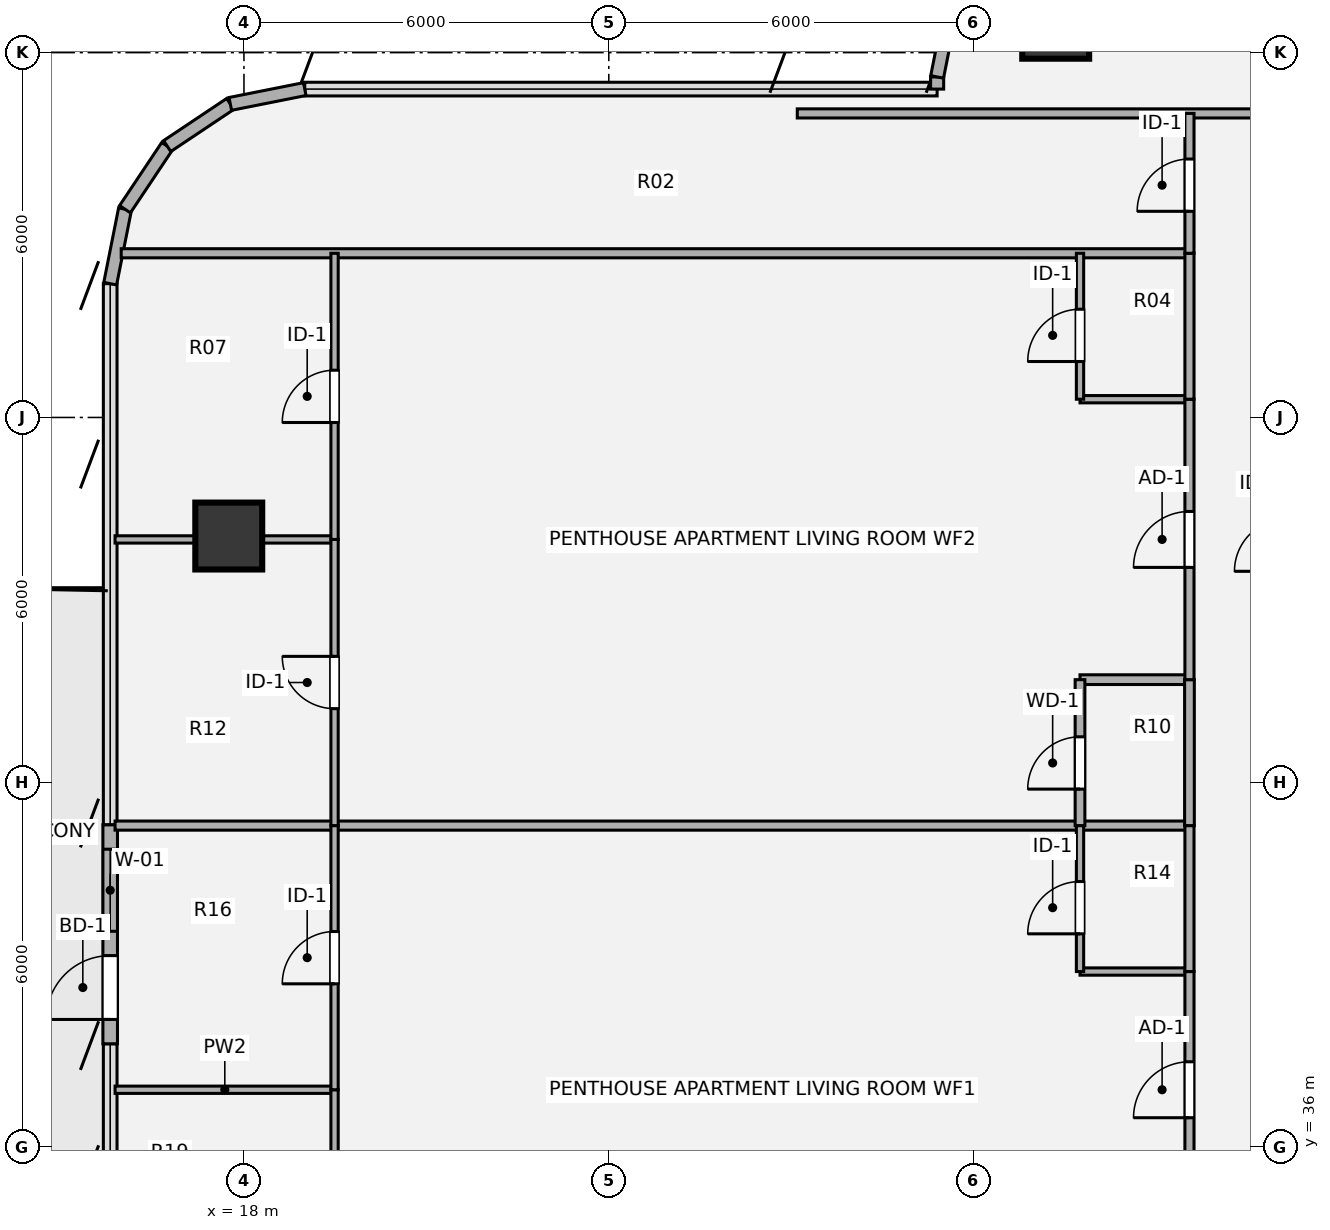
"""IFC4 building model, lengths in metres.
Left out: names, types, materials, properties, quantities, classifications, styles, units other than length and angle.
Written with IfcOpenShell. Run it as: python <this file> out.ifc"""

import sys

from ifc_helpers import new_model, si_unit, direction, frame, frame_2d, origin, origin_2d, place, context, subcontext, project, spatial, rectangle, hollow_circle, extrude, source, transform, mapped, element, fill, save


model = new_model("IFC4")
c1 = context("Model", 3, precision=1e-05, world=origin(), true_north=direction((0.0, 1.0)))
c2 = subcontext(c1, "Body", "Model", "MODEL_VIEW")
j1 = project(units=[si_unit("LENGTHUNIT", "METRE"), si_unit("PLANEANGLEUNIT", "RADIAN")], contexts=[c1])
p1 = place(None, origin())
s1 = spatial("IfcSite", under=j1, at=p1, CompositionType="ELEMENT")
p2 = place(p1, origin())
s2 = spatial("IfcBuilding", under=s1, at=p2, CompositionType="ELEMENT")
p3 = place(p2, frame((0.0, 0.0, 163.98)))
s3 = spatial("IfcBuildingStorey", under=s2, at=p3, CompositionType="ELEMENT", Elevation=163.98)
m1 = source(origin(), c2, "Body", "SweptSolid", [
    extrude(hollow_circle(Radius=0.55, WallThickness=0.04, at=origin_2d()), origin(), (0.0, 0.0, 1.0), 3.78),
])
for number, where, z_axis, x_axis in (
    (1, (17.75, 46.05, 0.0), (0.0, 0.0, 1.0), (1.0, 0.0, 0.0)),
    (2, (31.35, 54.45, 0.0), (0.0, 0.0, 1.0), (1.0, 0.0, 0.0)),
):
    element("IfcColumn", number, at=place(p3, frame(where, z_axis=z_axis, x_axis=x_axis)), inside=s3, PredefinedType="COLUMN", context=c2, shape_type="MappedRepresentation", body=[
        mapped(m1, transform((0.0, 0.0, 0.0), x_axis=(1.0, 0.0, 0.0), y_axis=(0.0, 1.0, 0.0), z_axis=(0.0, 0.0, 1.0), scale=1.0)),
    ])
p4 = place(p3, frame((15.8, 37.7, 0.0), z_axis=(0.0, 0.0, 1.0), x_axis=(0.0, 1.0, 0.0)))
e3 = element("IfcWall", 3, at=p4, inside=s3, PredefinedType="SOLIDWALL", context=c2, shape_type="SweptSolid", body=[
    extrude(rectangle(XDim=3.6, YDim=0.24, at=frame_2d((1.8, 0.0))), origin(), (0.0, 0.0, 1.0), 3.53),
])
p5 = place(p4, frame((0.4, 0.0, 0.0)))
e4 = element("IfcOpeningElement", 4, at=p5, cuts=e3, PredefinedType="OPENING", context=c2, shape_type="SweptSolid", body=[
    extrude(rectangle(XDim=1.05, YDim=2.15, at=origin_2d()), frame((0.525, 0.13, 1.075), z_axis=(0.0, -1.0, 0.0), x_axis=(1.0, 0.0, 0.0)), (0.0, 0.0, 1.0), 0.26),
])
p6 = place(p4, frame((1.85, 0.0, 0.85)))
e5 = element("IfcOpeningElement", 5, at=p6, cuts=e3, PredefinedType="OPENING", context=c2, shape_type="SweptSolid", body=[
    extrude(rectangle(XDim=1.35, YDim=1.35, at=origin_2d()), frame((0.675, 0.13, 0.675), z_axis=(0.0, -1.0, 0.0), x_axis=(1.0, 0.0, 0.0)), (0.0, 0.0, 1.0), 0.26),
])
for number, where, z_axis, x_axis in (
    (6, (15.8, 50.2, 0.0), (0.0, 0.0, 1.0), (0.195, 0.981, 0.0)),
    (7, (16.044, 51.425, 0.0), (0.0, 0.0, 1.0), (0.556, 0.831, 0.0)),
    (8, (16.737, 52.463, 0.0), (0.0, 0.0, 1.0), (0.831, 0.556, 0.0)),
    (9, (17.775, 53.156, 0.0), (0.0, 0.0, 1.0), (0.981, 0.195, 0.0)),
):
    element("IfcWall", number, at=place(p3, frame(where, z_axis=z_axis, x_axis=x_axis)), inside=s3, PredefinedType="SOLIDWALL", context=c2, shape_type="SweptSolid", body=[
        extrude(rectangle(XDim=1.249, YDim=0.215, at=frame_2d((0.624, 0.0))), origin(), (0.0, 0.0, 1.0), 3.53),
    ])
p7 = place(p3, frame((29.4, 53.4, 0.0), z_axis=(0.0, 0.0, 1.0), x_axis=(0.0, 1.0, 0.0)))
e10 = element("IfcWall", 10, at=p7, inside=s3, PredefinedType="SOLIDWALL", context=c2, shape_type="SweptSolid", body=[
    extrude(rectangle(XDim=0.2, YDim=0.215, at=frame_2d((0.1, 0.0))), origin(), (0.0, 0.0, 1.0), 3.53),
])
p8 = place(p3, frame((29.4, 53.6, 0.0), z_axis=(0.0, 0.0, 1.0), x_axis=(0.195127417394, 0.980777900945, 0.0)))
e11 = element("IfcWall", 11, at=p8, inside=s3, PredefinedType="SOLIDWALL", context=c2, shape_type="SweptSolid", body=[
    extrude(rectangle(XDim=1.092, YDim=0.215, at=frame_2d((0.546, 0.0))), origin(), (0.0, 0.0, 1.0), 3.53),
])
p9 = place(p3, frame((15.88, 36.944, 0.0), z_axis=(0.0, 0.0, 1.0), x_axis=(1.0, 0.0, 0.0)))
e12 = element("IfcWall", 12, at=p9, inside=s3, PredefinedType="PARTITIONING", context=c2, shape_type="SweptSolid", body=[
    extrude(rectangle(XDim=3.61, YDim=0.12, at=frame_2d((1.805, 0.0))), origin(), (0.0, 0.0, 1.0), 2.982),
])
p10 = place(p3, frame((31.75, 38.888, 0.0), z_axis=(0.0, 0.0, 1.0), x_axis=(1.0, 0.0, 0.0)))
e13 = element("IfcWall", 13, at=p10, inside=s3, PredefinedType="PARTITIONING", context=c2, shape_type="SweptSolid", body=[
    extrude(rectangle(XDim=1.8, YDim=0.12, at=frame_2d((0.9, 0.0))), origin(), (0.0, 0.0, 1.0), 3.259),
])
p11 = place(p3, frame((15.88, 41.288, 0.0), z_axis=(0.0, 0.0, 1.0), x_axis=(1.0, 0.0, 0.0)))
e14 = element("IfcWall", 14, at=p11, inside=s3, PredefinedType="PARTITIONING", context=c2, shape_type="SweptSolid", body=[
    extrude(rectangle(XDim=17.67, YDim=0.15, at=frame_2d((8.835, 0.0))), origin(), (0.0, 0.0, 1.0), 2.982),
])
p12 = place(p3, frame((31.75, 43.688, 0.0), z_axis=(0.0, 0.0, 1.0), x_axis=(1.0, 0.0, 0.0)))
e15 = element("IfcWall", 15, at=p12, inside=s3, PredefinedType="PLUMBINGWALL", context=c2, shape_type="SweptSolid", body=[
    extrude(rectangle(XDim=1.8, YDim=0.16, at=frame_2d((0.9, 0.0))), origin(), (0.0, 0.0, 1.0), 3.259),
])
p13 = place(p3, frame((15.88, 45.994, 0.0), z_axis=(0.0, 0.0, 1.0), x_axis=(1.0, 0.0, 0.0)))
e16 = element("IfcWall", 16, at=p13, inside=s3, PredefinedType="PARTITIONING", context=c2, shape_type="SweptSolid", body=[
    extrude(rectangle(XDim=3.61, YDim=0.12, at=frame_2d((1.805, 0.0))), origin(), (0.0, 0.0, 1.0), 2.903),
])
p14 = place(p3, frame((31.75, 48.3, 0.0), z_axis=(0.0, 0.0, 1.0), x_axis=(1.0, 0.0, 0.0)))
e17 = element("IfcWall", 17, at=p14, inside=s3, PredefinedType="PARTITIONING", context=c2, shape_type="SweptSolid", body=[
    extrude(rectangle(XDim=1.8, YDim=0.12, at=frame_2d((0.9, 0.0))), origin(), (0.0, 0.0, 1.0), 3.259),
])
p15 = place(p3, frame((15.981, 50.7, 0.0), z_axis=(0.0, 0.0, 1.0), x_axis=(1.0, 0.0, 0.0)))
e18 = element("IfcWall", 18, at=p15, inside=s3, PredefinedType="PARTITIONING", context=c2, shape_type="SweptSolid", body=[
    extrude(rectangle(XDim=17.569, YDim=0.15, at=frame_2d((8.785, 0.0))), origin(), (0.0, 0.0, 1.0), 3.308),
])
p16 = place(p3, frame((27.1, 53.0, 0.0), z_axis=(0.0, 0.0, 1.0), x_axis=(1.0, 0.0, 0.0)))
e19 = element("IfcWall", 19, at=p16, inside=s3, PredefinedType="PARTITIONING", context=c2, shape_type="SweptSolid", body=[
    extrude(rectangle(XDim=17.8, YDim=0.15, at=frame_2d((8.9, 0.0))), origin(), (0.0, 0.0, 1.0), 3.308),
])
p17 = place(p16, frame((8.375, 0.0, 0.0)))
e20 = element("IfcOpeningElement", 20, at=p17, cuts=e19, PredefinedType="OPENING", context=c2, shape_type="SweptSolid", body=[
    extrude(rectangle(XDim=1.05, YDim=2.1, at=origin_2d()), frame((0.525, 0.085, 1.05), z_axis=(0.0, -1.0, 0.0), x_axis=(1.0, 0.0, 0.0)), (0.0, 0.0, 1.0), 0.17),
])
p18 = place(p3, frame((19.49, 32.48, 0.0), z_axis=(0.0, 0.0, 1.0), x_axis=(0.0, 1.0, 0.0)))
e21 = element("IfcWall", 21, at=p18, inside=s3, PredefinedType="PARTITIONING", context=c2, shape_type="SweptSolid", body=[
    extrude(rectangle(XDim=4.464, YDim=0.12, at=frame_2d((2.232, 0.0))), origin(), (0.0, 0.0, 1.0), 3.5),
])
p19 = place(p18, frame((0.362, 0.0, 0.0)))
e22 = element("IfcOpeningElement", 22, at=p19, cuts=e21, PredefinedType="OPENING", context=c2, shape_type="SweptSolid", body=[
    extrude(rectangle(XDim=0.86, YDim=2.1, at=origin_2d()), frame((0.43, 0.07, 1.05), z_axis=(0.0, -1.0, 0.0), x_axis=(1.0, 0.0, 0.0)), (0.0, 0.0, 1.0), 0.14),
])
p20 = place(p3, frame((19.49, 36.944, 0.0), z_axis=(0.0, 0.0, 1.0), x_axis=(0.0, 1.0, 0.0)))
e23 = element("IfcWall", 23, at=p20, inside=s3, PredefinedType="PARTITIONING", context=c2, shape_type="SweptSolid", body=[
    extrude(rectangle(XDim=4.344, YDim=0.12, at=frame_2d((2.172, 0.0))), origin(), (0.0, 0.0, 1.0), 3.5),
])
p21 = place(p20, frame((1.742, 0.0, 0.0)))
e24 = element("IfcOpeningElement", 24, at=p21, cuts=e23, PredefinedType="OPENING", context=c2, shape_type="SweptSolid", body=[
    extrude(rectangle(XDim=0.86, YDim=2.1, at=origin_2d()), frame((0.43, 0.07, 1.05), z_axis=(0.0, -1.0, 0.0), x_axis=(1.0, 0.0, 0.0)), (0.0, 0.0, 1.0), 0.14),
])
p22 = place(p3, frame((19.49, 41.288, 0.0), z_axis=(0.0, 0.0, 1.0), x_axis=(0.0, 1.0, 0.0)))
e25 = element("IfcWall", 25, at=p22, inside=s3, PredefinedType="PARTITIONING", context=c2, shape_type="SweptSolid", body=[
    extrude(rectangle(XDim=4.706, YDim=0.12, at=frame_2d((2.353, 0.0))), origin(), (0.0, 0.0, 1.0), 3.5),
])
p23 = place(p22, frame((1.923, 0.0, 0.0)))
e26 = element("IfcOpeningElement", 26, at=p23, cuts=e25, PredefinedType="OPENING", context=c2, shape_type="SweptSolid", body=[
    extrude(rectangle(XDim=0.86, YDim=2.1, at=origin_2d()), frame((0.43, 0.07, 1.05), z_axis=(0.0, -1.0, 0.0), x_axis=(1.0, 0.0, 0.0)), (0.0, 0.0, 1.0), 0.14),
])
p24 = place(p3, frame((19.49, 45.994, 0.0), z_axis=(0.0, 0.0, 1.0), x_axis=(0.0, 1.0, 0.0)))
e27 = element("IfcWall", 27, at=p24, inside=s3, PredefinedType="PARTITIONING", context=c2, shape_type="SweptSolid", body=[
    extrude(rectangle(XDim=4.706, YDim=0.12, at=frame_2d((2.353, 0.0))), origin(), (0.0, 0.0, 1.0), 3.5),
])
p25 = place(p24, frame((1.923, 0.0, 0.0)))
e28 = element("IfcOpeningElement", 28, at=p25, cuts=e27, PredefinedType="OPENING", context=c2, shape_type="SweptSolid", body=[
    extrude(rectangle(XDim=0.86, YDim=2.1, at=origin_2d()), frame((0.43, 0.07, 1.05), z_axis=(0.0, -1.0, 0.0), x_axis=(1.0, 0.0, 0.0)), (0.0, 0.0, 1.0), 0.14),
])
p26 = place(p3, frame((31.75, 38.888, 0.0), z_axis=(0.0, 0.0, 1.0), x_axis=(0.0, 1.0, 0.0)))
e29 = element("IfcWall", 29, at=p26, inside=s3, PredefinedType="PARTITIONING", context=c2, shape_type="SweptSolid", body=[
    extrude(rectangle(XDim=2.4, YDim=0.12, at=frame_2d((1.2, 0.0))), origin(), (0.0, 0.0, 1.0), 3.5),
])
p27 = place(p26, frame((0.62, 0.0, 0.0)))
e30 = element("IfcOpeningElement", 30, at=p27, cuts=e29, PredefinedType="OPENING", context=c2, shape_type="SweptSolid", body=[
    extrude(rectangle(XDim=0.86, YDim=2.1, at=origin_2d()), frame((0.43, 0.07, 1.05), z_axis=(0.0, -1.0, 0.0), x_axis=(1.0, 0.0, 0.0)), (0.0, 0.0, 1.0), 0.14),
])
p28 = place(p3, frame((31.75, 41.288, 0.0), z_axis=(0.0, 0.0, 1.0), x_axis=(0.0, 1.0, 0.0)))
e31 = element("IfcWall", 31, at=p28, inside=s3, PredefinedType="PLUMBINGWALL", context=c2, shape_type="SweptSolid", body=[
    extrude(rectangle(XDim=2.4, YDim=0.16, at=frame_2d((1.2, 0.0))), origin(), (0.0, 0.0, 1.0), 3.5),
])
p29 = place(p28, frame((0.6, 0.0, 0.0)))
e32 = element("IfcOpeningElement", 32, at=p29, cuts=e31, PredefinedType="OPENING", context=c2, shape_type="SweptSolid", body=[
    extrude(rectangle(XDim=0.86, YDim=2.1, at=origin_2d()), frame((0.43, 0.09, 1.05), z_axis=(0.0, -1.0, 0.0), x_axis=(1.0, 0.0, 0.0)), (0.0, 0.0, 1.0), 0.18),
])
p30 = place(p3, frame((31.75, 48.3, 0.0), z_axis=(0.0, 0.0, 1.0), x_axis=(0.0, 1.0, 0.0)))
e33 = element("IfcWall", 33, at=p30, inside=s3, PredefinedType="PARTITIONING", context=c2, shape_type="SweptSolid", body=[
    extrude(rectangle(XDim=2.4, YDim=0.12, at=frame_2d((1.2, 0.0))), origin(), (0.0, 0.0, 1.0), 3.5),
])
p31 = place(p30, frame((0.62, 0.0, 0.0)))
e34 = element("IfcOpeningElement", 34, at=p31, cuts=e33, PredefinedType="OPENING", context=c2, shape_type="SweptSolid", body=[
    extrude(rectangle(XDim=0.86, YDim=2.1, at=origin_2d()), frame((0.43, 0.07, 1.05), z_axis=(0.0, -1.0, 0.0), x_axis=(1.0, 0.0, 0.0)), (0.0, 0.0, 1.0), 0.14),
])
p32 = place(p3, frame((33.55, 35.0, 0.0), z_axis=(0.0, 0.0, 1.0), x_axis=(0.0, 1.0, 0.0)))
e35 = element("IfcWall", 35, at=p32, inside=s3, PredefinedType="PARTITIONING", context=c2, shape_type="SweptSolid", body=[
    extrude(rectangle(XDim=3.888, YDim=0.15, at=frame_2d((1.944, 0.0))), origin(), (0.0, 0.0, 1.0), 3.5),
])
p33 = place(p32, frame((1.484, 0.0, 0.0)))
e36 = element("IfcOpeningElement", 36, at=p33, cuts=e35, PredefinedType="OPENING", context=c2, shape_type="SweptSolid", body=[
    extrude(rectangle(XDim=0.92, YDim=2.1, at=origin_2d()), frame((0.46, 0.085, 1.05), z_axis=(0.0, -1.0, 0.0), x_axis=(1.0, 0.0, 0.0)), (0.0, 0.0, 1.0), 0.17),
])
p34 = place(p3, frame((33.55, 38.888, 0.0), z_axis=(0.0, 0.0, 1.0), x_axis=(0.0, 1.0, 0.0)))
e37 = element("IfcWall", 37, at=p34, inside=s3, PredefinedType="PARTITIONING", context=c2, shape_type="SweptSolid", body=[
    extrude(rectangle(XDim=2.4, YDim=0.15, at=frame_2d((1.2, 0.0))), origin(), (0.0, 0.0, 1.0), 3.5),
])
p35 = place(p3, frame((33.55, 41.288, 0.0), z_axis=(0.0, 0.0, 1.0), x_axis=(0.0, 1.0, 0.0)))
e38 = element("IfcWall", 38, at=p35, inside=s3, PredefinedType="PLUMBINGWALL", context=c2, shape_type="SweptSolid", body=[
    extrude(rectangle(XDim=2.4, YDim=0.16, at=frame_2d((1.2, 0.0))), origin(), (0.0, 0.0, 1.0), 3.5),
])
p36 = place(p3, frame((33.55, 43.688, 0.0), z_axis=(0.0, 0.0, 1.0), x_axis=(0.0, 1.0, 0.0)))
e39 = element("IfcWall", 39, at=p36, inside=s3, PredefinedType="PARTITIONING", context=c2, shape_type="SweptSolid", body=[
    extrude(rectangle(XDim=4.612, YDim=0.15, at=frame_2d((2.306, 0.0))), origin(), (0.0, 0.0, 1.0), 3.5),
])
p37 = place(p36, frame((1.846, 0.0, 0.0)))
e40 = element("IfcOpeningElement", 40, at=p37, cuts=e39, PredefinedType="OPENING", context=c2, shape_type="SweptSolid", body=[
    extrude(rectangle(XDim=0.92, YDim=2.1, at=origin_2d()), frame((0.46, 0.085, 1.05), z_axis=(0.0, -1.0, 0.0), x_axis=(1.0, 0.0, 0.0)), (0.0, 0.0, 1.0), 0.17),
])
p38 = place(p3, frame((33.55, 48.3, 0.0), z_axis=(0.0, 0.0, 1.0), x_axis=(0.0, 1.0, 0.0)))
e41 = element("IfcWall", 41, at=p38, inside=s3, PredefinedType="PARTITIONING", context=c2, shape_type="SweptSolid", body=[
    extrude(rectangle(XDim=2.4, YDim=0.15, at=frame_2d((1.2, 0.0))), origin(), (0.0, 0.0, 1.0), 3.5),
])
p39 = place(p3, frame((33.55, 50.7, 0.0), z_axis=(0.0, 0.0, 1.0), x_axis=(0.0, 1.0, 0.0)))
e42 = element("IfcWall", 42, at=p39, inside=s3, PredefinedType="PARTITIONING", context=c2, shape_type="SweptSolid", body=[
    extrude(rectangle(XDim=2.3, YDim=0.15, at=frame_2d((1.15, 0.0))), origin(), (0.0, 0.0, 1.0), 3.5),
])
p40 = place(p39, frame((0.69, 0.0, 0.0)))
e43 = element("IfcOpeningElement", 43, at=p40, cuts=e42, PredefinedType="OPENING", context=c2, shape_type="SweptSolid", body=[
    extrude(rectangle(XDim=0.86, YDim=2.1, at=origin_2d()), frame((0.43, 0.085, 1.05), z_axis=(0.0, -1.0, 0.0), x_axis=(1.0, 0.0, 0.0)), (0.0, 0.0, 1.0), 0.17),
])
m2 = source(origin(), c2, "Body", "SweptSolid", [
    extrude(rectangle(XDim=1.05, YDim=2.15, at=origin_2d()), frame((0.525, 0.025, 1.075), z_axis=(0.0, -1.0, 0.0), x_axis=(1.0, 0.0, 0.0)), (0.0, 0.0, 1.0), 0.05),
])
p41 = place(p5, origin())
e44 = element("IfcDoor", 44, at=p41, inside=s3, OperationType="SINGLE_SWING_LEFT", PredefinedType="DOOR", context=c2, shape_type="MappedRepresentation", body=[
    mapped(m2, transform((0.0, 0.0, 0.0), x_axis=(1.0, 0.0, 0.0), y_axis=(0.0, 1.0, 0.0), z_axis=(0.0, 0.0, 1.0), scale=1.0)),
])
fill(e4, e44)
m3 = source(origin(), c2, "Body", "SweptSolid", [
    extrude(rectangle(XDim=1.35, YDim=1.35, at=origin_2d()), frame((0.675, 0.03, 0.675), z_axis=(0.0, -1.0, 0.0), x_axis=(1.0, 0.0, 0.0)), (0.0, 0.0, 1.0), 0.06),
])
p42 = place(p6, origin())
e45 = element("IfcWindow", 45, at=p42, inside=s3, PartitioningType="SINGLE_PANEL", PredefinedType="WINDOW", context=c2, shape_type="MappedRepresentation", body=[
    mapped(m3, transform((0.0, 0.0, 0.0), x_axis=(1.0, 0.0, 0.0), y_axis=(0.0, 1.0, 0.0), z_axis=(0.0, 0.0, 1.0), scale=1.0)),
])
fill(e5, e45)
m4 = source(origin(), c2, "Body", "SweptSolid", [
    extrude(rectangle(XDim=0.86, YDim=2.1, at=origin_2d()), frame((0.43, 0.025, 1.05), z_axis=(0.0, -1.0, 0.0), x_axis=(1.0, 0.0, 0.0)), (0.0, 0.0, 1.0), 0.05),
])
p43 = place(p21, origin())
e46 = element("IfcDoor", 46, at=p43, inside=s3, OperationType="SINGLE_SWING_LEFT", PredefinedType="DOOR", context=c2, shape_type="MappedRepresentation", body=[
    mapped(m4, transform((0.0, 0.0, 0.0), x_axis=(1.0, 0.0, 0.0), y_axis=(0.0, 1.0, 0.0), z_axis=(0.0, 0.0, 1.0), scale=1.0)),
])
fill(e24, e46)
p44 = place(p23, origin())
e47 = element("IfcDoor", 47, at=p44, inside=s3, OperationType="SINGLE_SWING_RIGHT", PredefinedType="DOOR", context=c2, shape_type="MappedRepresentation", body=[
    mapped(m4, transform((0.0, 0.0, 0.0), x_axis=(1.0, 0.0, 0.0), y_axis=(0.0, 1.0, 0.0), z_axis=(0.0, 0.0, 1.0), scale=1.0)),
])
fill(e26, e47)
p45 = place(p25, origin())
e48 = element("IfcDoor", 48, at=p45, inside=s3, OperationType="SINGLE_SWING_LEFT", PredefinedType="DOOR", context=c2, shape_type="MappedRepresentation", body=[
    mapped(m4, transform((0.0, 0.0, 0.0), x_axis=(1.0, 0.0, 0.0), y_axis=(0.0, 1.0, 0.0), z_axis=(0.0, 0.0, 1.0), scale=1.0)),
])
fill(e28, e48)
p46 = place(p27, origin())
e49 = element("IfcDoor", 49, at=p46, inside=s3, OperationType="SINGLE_SWING_LEFT", PredefinedType="DOOR", context=c2, shape_type="MappedRepresentation", body=[
    mapped(m4, transform((0.0, 0.0, 0.0), x_axis=(1.0, 0.0, 0.0), y_axis=(0.0, 1.0, 0.0), z_axis=(0.0, 0.0, 1.0), scale=1.0)),
])
fill(e30, e49)
m5 = source(origin(), c2, "Body", "SweptSolid", [
    extrude(rectangle(XDim=0.86, YDim=2.1, at=origin_2d()), frame((0.43, 0.025, 1.05), z_axis=(0.0, -1.0, 0.0), x_axis=(1.0, 0.0, 0.0)), (0.0, 0.0, 1.0), 0.05),
])
p47 = place(p29, origin())
e50 = element("IfcDoor", 50, at=p47, inside=s3, OperationType="SINGLE_SWING_LEFT", PredefinedType="DOOR", context=c2, shape_type="MappedRepresentation", body=[
    mapped(m5, transform((0.0, 0.0, 0.0), x_axis=(1.0, 0.0, 0.0), y_axis=(0.0, 1.0, 0.0), z_axis=(0.0, 0.0, 1.0), scale=1.0)),
])
fill(e32, e50)
p48 = place(p31, origin())
e51 = element("IfcDoor", 51, at=p48, inside=s3, OperationType="SINGLE_SWING_LEFT", PredefinedType="DOOR", context=c2, shape_type="MappedRepresentation", body=[
    mapped(m4, transform((0.0, 0.0, 0.0), x_axis=(1.0, 0.0, 0.0), y_axis=(0.0, 1.0, 0.0), z_axis=(0.0, 0.0, 1.0), scale=1.0)),
])
fill(e34, e51)
m6 = source(origin(), c2, "Body", "SweptSolid", [
    extrude(rectangle(XDim=0.92, YDim=2.1, at=origin_2d()), frame((0.46, 0.025, 1.05), z_axis=(0.0, -1.0, 0.0), x_axis=(1.0, 0.0, 0.0)), (0.0, 0.0, 1.0), 0.05),
])
p49 = place(p33, origin())
e52 = element("IfcDoor", 52, at=p49, inside=s3, OperationType="SINGLE_SWING_LEFT", PredefinedType="DOOR", context=c2, shape_type="MappedRepresentation", body=[
    mapped(m6, transform((0.0, 0.0, 0.0), x_axis=(1.0, 0.0, 0.0), y_axis=(0.0, 1.0, 0.0), z_axis=(0.0, 0.0, 1.0), scale=1.0)),
])
fill(e36, e52)
p50 = place(p37, origin())
e53 = element("IfcDoor", 53, at=p50, inside=s3, OperationType="SINGLE_SWING_LEFT", PredefinedType="DOOR", context=c2, shape_type="MappedRepresentation", body=[
    mapped(m6, transform((0.0, 0.0, 0.0), x_axis=(1.0, 0.0, 0.0), y_axis=(0.0, 1.0, 0.0), z_axis=(0.0, 0.0, 1.0), scale=1.0)),
])
fill(e40, e53)
p51 = place(p40, origin())
e54 = element("IfcDoor", 54, at=p51, inside=s3, OperationType="SINGLE_SWING_LEFT", PredefinedType="DOOR", context=c2, shape_type="MappedRepresentation", body=[
    mapped(m4, transform((0.0, 0.0, 0.0), x_axis=(1.0, 0.0, 0.0), y_axis=(0.0, 1.0, 0.0), z_axis=(0.0, 0.0, 1.0), scale=1.0)),
])
fill(e43, e54)
save(model, sys.argv[1])
